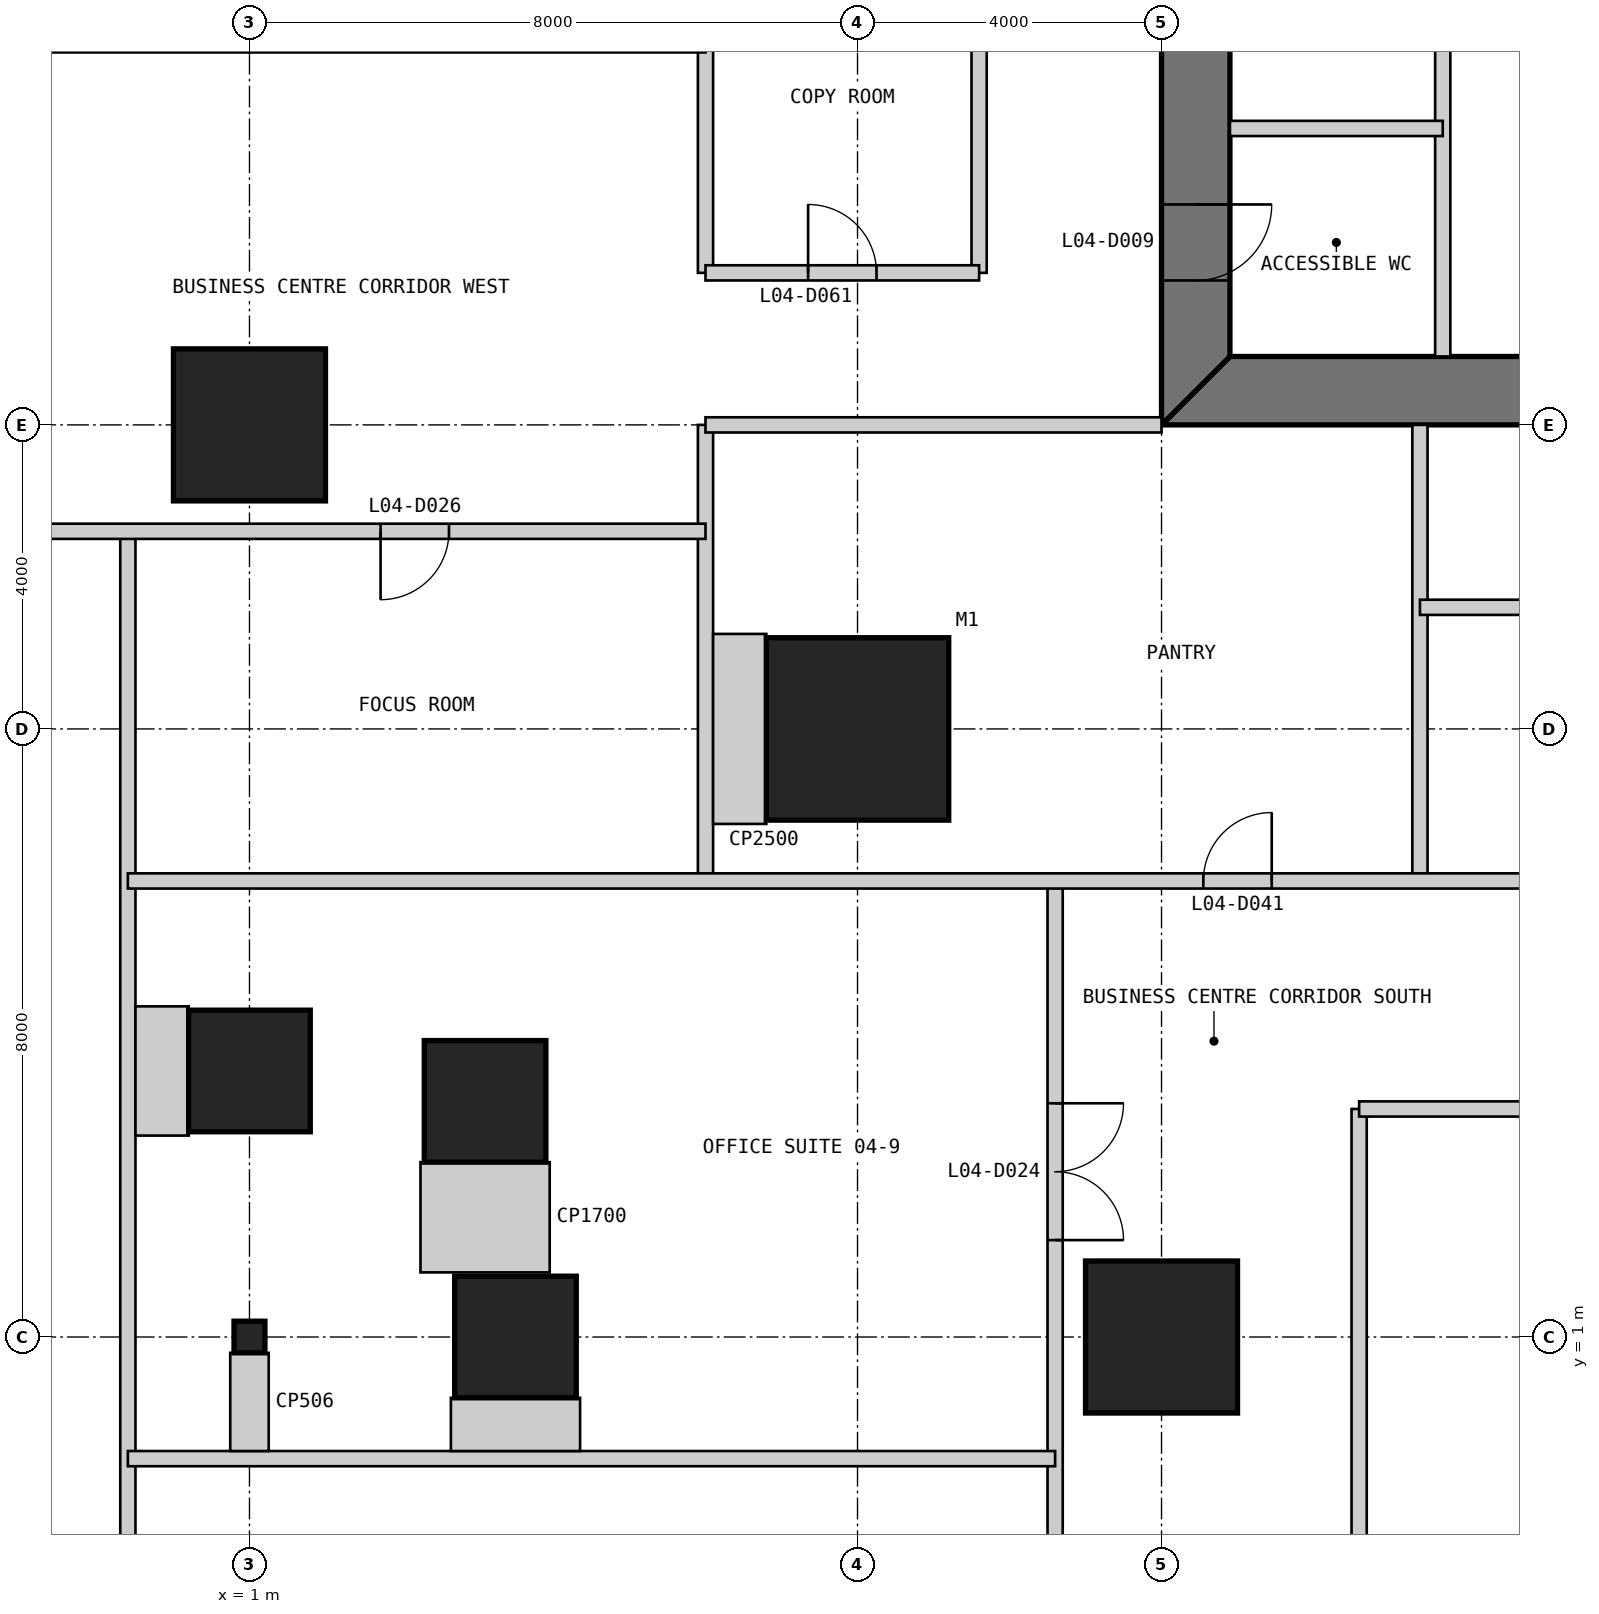
"""IFC4 building model, lengths in metres.
Left out: names, types, materials, properties, quantities, classifications, styles, units other than length and angle.
Written with IfcOpenShell. Run it as: python <this file> out.ifc"""

import sys

from ifc_helpers import new_model, si_unit, direction, frame, frame_2d, origin, origin_2d, place, context, subcontext, project, spatial, polyline, rectangle, i_section, outline, extrude, element, fill, save


model = new_model("IFC4")
c1 = context("Model", 3, precision=1e-05, world=origin(), true_north=direction((0.0, 1.0)))
c2 = subcontext(c1, "Body", "Model", "MODEL_VIEW")
j1 = project(units=[si_unit("LENGTHUNIT", "METRE"), si_unit("PLANEANGLEUNIT", "RADIAN")], contexts=[c1])
p1 = place(None, origin())
s1 = spatial("IfcSite", under=j1, at=p1, CompositionType="ELEMENT")
p2 = place(p1, origin())
s2 = spatial("IfcBuilding", under=s1, at=p2, CompositionType="ELEMENT")
p3 = place(p2, frame((0.0, 0.0, 21.4)))
s3 = spatial("IfcBuildingStorey", under=s2, at=p3, CompositionType="ELEMENT", Elevation=21.4)
p4 = place(p3, frame((9.0, 9.0, 0.0), z_axis=(0.0, 0.0, 1.0), x_axis=(1.0, 0.0, 0.0)))
e1 = element("IfcColumn", 1, at=p4, inside=s3, PredefinedType="COLUMN", context=c2, shape_type="SweptSolid", body=[
    extrude(rectangle(XDim=2.4, YDim=2.4, at=origin_2d()), origin(), (0.0, 0.0, 1.0), 4.8),
])
p5 = place(p3, frame((4.5, 1.0, 0.0), z_axis=(0.0, 0.0, 1.0), x_axis=(1.0, 0.0, 0.0)))
e2 = element("IfcColumn", 2, at=p5, inside=s3, PredefinedType="COLUMN", context=c2, shape_type="SweptSolid", body=[
    extrude(rectangle(XDim=1.6, YDim=1.6, at=origin_2d()), origin(), (0.0, 0.0, 1.0), 4.8),
])
for number, where, z_axis, x_axis in (
    (3, (13.0, 1.0, 0.0), (0.0, 0.0, 1.0), (1.0, 0.0, 0.0)),
    (4, (1.0, 13.0, 0.0), (0.0, 0.0, 1.0), (1.0, 0.0, 0.0)),
):
    element("IfcColumn", number, at=place(p3, frame(where, z_axis=z_axis, x_axis=x_axis)), inside=s3, PredefinedType="COLUMN", context=c2, shape_type="SweptSolid", body=[
        extrude(rectangle(XDim=2.0, YDim=2.0, at=origin_2d()), origin(), (0.0, 0.0, 1.0), 4.8),
    ])
for number, where, z_axis, x_axis in (
    (5, (1.0, 4.5, 0.0), (0.0, 0.0, 1.0), (1.0, 0.0, 0.0)),
    (6, (4.1, 4.1, 0.0), (0.0, 0.0, 1.0), (1.0, 0.0, 0.0)),
):
    element("IfcColumn", number, at=place(p3, frame(where, z_axis=z_axis, x_axis=x_axis)), inside=s3, PredefinedType="COLUMN", context=c2, shape_type="SweptSolid", body=[
        extrude(rectangle(XDim=1.6, YDim=1.6, at=origin_2d()), origin(), (0.0, 0.0, 1.0), 4.8),
    ])
p6 = place(p3, frame((1.0, 1.0, 0.0), z_axis=(0.0, 0.0, 1.0), x_axis=(1.0, 0.0, 0.0)))
e7 = element("IfcColumn", 7, at=p6, inside=s3, PredefinedType="COLUMN", context=c2, shape_type="SweptSolid", body=[
    extrude(i_section(OverallWidth=0.406, OverallDepth=0.417, WebThickness=0.03, FlangeThickness=0.048, at=origin_2d()), origin(), (0.0, 0.0, 1.0), 4.8),
])
p7 = place(p3, frame((13.0, 13.45, 0.0), z_axis=(0.0, 0.0, 1.0), x_axis=(1.0, 0.0, 0.0)))
e8 = element("IfcWall", 8, at=p7, inside=s3, PredefinedType="SHEAR", context=c2, shape_type="SweptSolid", body=[
    extrude(outline(polyline([(0.0, -0.45), (24.0, -0.45), (23.1, 0.45), (0.9, 0.45), (0.0, -0.45)])), origin(), (0.0, 0.0, 1.0), 4.8),
])
p8 = place(p7, frame((4.9, 0.0, 0.0)))
e9 = element("IfcOpeningElement", 9, at=p8, cuts=e8, PredefinedType="OPENING", context=c2, shape_type="SweptSolid", body=[
    extrude(rectangle(XDim=1.0, YDim=2.2, at=frame_2d((0.5, 1.1))), frame((0.0, 0.46, 0.0), z_axis=(0.0, -1.0, 0.0), x_axis=(1.0, 0.0, 0.0)), (0.0, 0.0, 1.0), 0.92),
])
p9 = place(p7, frame((8.9, 0.0, 0.0)))
e10 = element("IfcOpeningElement", 10, at=p9, cuts=e8, PredefinedType="OPENING", context=c2, shape_type="SweptSolid", body=[
    extrude(rectangle(XDim=1.1, YDim=2.2, at=frame_2d((0.55, 1.1))), frame((0.0, 0.46, 0.0), z_axis=(0.0, -1.0, 0.0), x_axis=(1.0, 0.0, 0.0)), (0.0, 0.0, 1.0), 0.92),
])
p10 = place(p7, frame((15.05, 0.0, 0.0)))
e11 = element("IfcOpeningElement", 11, at=p10, cuts=e8, PredefinedType="OPENING", context=c2, shape_type="SweptSolid", body=[
    extrude(rectangle(XDim=0.9, YDim=2.2, at=frame_2d((0.45, 1.1))), frame((0.0, 0.46, 0.0), z_axis=(0.0, -1.0, 0.0), x_axis=(1.0, 0.0, 0.0)), (0.0, 0.0, 1.0), 0.92),
])
p11 = place(p7, frame((17.9, 0.0, 0.0)))
e12 = element("IfcOpeningElement", 12, at=p11, cuts=e8, PredefinedType="OPENING", context=c2, shape_type="SweptSolid", body=[
    extrude(rectangle(XDim=1.0, YDim=2.2, at=frame_2d((0.5, 1.1))), frame((0.0, 0.46, 0.0), z_axis=(0.0, -1.0, 0.0), x_axis=(1.0, 0.0, 0.0)), (0.0, 0.0, 1.0), 0.92),
])
p12 = place(p7, frame((21.4, 0.0, 0.0)))
e13 = element("IfcOpeningElement", 13, at=p12, cuts=e8, PredefinedType="OPENING", context=c2, shape_type="SweptSolid", body=[
    extrude(rectangle(XDim=1.0, YDim=2.2, at=frame_2d((0.5, 1.1))), frame((0.0, 0.46, 0.0), z_axis=(0.0, -1.0, 0.0), x_axis=(1.0, 0.0, 0.0)), (0.0, 0.0, 1.0), 0.92),
])
p13 = place(p3, frame((13.45, 36.1, 0.0), z_axis=(0.0, 0.0, 1.0), x_axis=(0.0, -1.0, 0.0)))
e14 = element("IfcWall", 14, at=p13, inside=s3, PredefinedType="SHEAR", context=c2, shape_type="SweptSolid", body=[
    extrude(outline(polyline([(-0.9, -0.45), (23.1, -0.45), (22.2, 0.45), (0.0, 0.45), (-0.9, -0.45)])), origin(), (0.0, 0.0, 1.0), 4.8),
])
p14 = place(p13, frame((20.2, 0.0, 0.0)))
e15 = element("IfcOpeningElement", 15, at=p14, cuts=e14, PredefinedType="OPENING", context=c2, shape_type="SweptSolid", body=[
    extrude(rectangle(XDim=1.0, YDim=2.2, at=frame_2d((0.5, 1.1))), frame((0.0, 0.46, 0.0), z_axis=(0.0, -1.0, 0.0), x_axis=(1.0, 0.0, 0.0)), (0.0, 0.0, 1.0), 0.92),
])
p15 = place(p13, frame((17.25, 0.0, 0.0)))
e16 = element("IfcOpeningElement", 16, at=p15, cuts=e14, PredefinedType="OPENING", context=c2, shape_type="SweptSolid", body=[
    extrude(rectangle(XDim=0.9, YDim=2.2, at=frame_2d((0.45, 1.1))), frame((0.0, 0.46, 0.0), z_axis=(0.0, -1.0, 0.0), x_axis=(1.0, 0.0, 0.0)), (0.0, 0.0, 1.0), 0.92),
])
p16 = place(p3, frame((16.7, 13.9, 0.0), z_axis=(0.0, 0.0, 1.0), x_axis=(0.0, 1.0, 0.0)))
e17 = element("IfcWall", 17, at=p16, inside=s3, PredefinedType="PARTITIONING", context=c2, shape_type="SweptSolid", body=[
    extrude(rectangle(XDim=16.1, YDim=0.2, at=frame_2d((8.05, 0.0))), origin(), (0.0, 0.0, 1.0), 4.6),
])
p17 = place(p3, frame((13.9, 16.9, 0.0), z_axis=(0.0, 0.0, 1.0), x_axis=(1.0, 0.0, 0.0)))
e18 = element("IfcWall", 18, at=p17, inside=s3, PredefinedType="PARTITIONING", context=c2, shape_type="SweptSolid", body=[
    extrude(rectangle(XDim=2.8, YDim=0.2, at=frame_2d((1.4, 0.0))), origin(), (0.0, 0.0, 1.0), 4.6),
])
p18 = place(p3, frame((-0.6, -7.25, 0.0), z_axis=(0.0, 0.0, 1.0), x_axis=(0.0, 1.0, 0.0)))
e19 = element("IfcWall", 19, at=p18, inside=s3, PredefinedType="PARTITIONING", context=c2, shape_type="SweptSolid", body=[
    extrude(rectangle(XDim=18.85, YDim=0.2, at=frame_2d((9.425, 0.0))), origin(), (0.0, 0.0, 1.0), 4.5),
])
p19 = place(p3, frame((7.0, 7.0, 0.0), z_axis=(0.0, 0.0, 1.0), x_axis=(0.0, 1.0, 0.0)))
e20 = element("IfcWall", 20, at=p19, inside=s3, PredefinedType="PARTITIONING", context=c2, shape_type="SweptSolid", body=[
    extrude(rectangle(XDim=6.0, YDim=0.2, at=frame_2d((3.0, 0.0))), origin(), (0.0, 0.0, 1.0), 4.5),
])
p20 = place(p3, frame((7.0, 15.0, 0.0), z_axis=(0.0, 0.0, 1.0), x_axis=(0.0, 1.0, 0.0)))
e21 = element("IfcWall", 21, at=p20, inside=s3, PredefinedType="PARTITIONING", context=c2, shape_type="SweptSolid", body=[
    extrude(rectangle(XDim=28.0, YDim=0.2, at=frame_2d((14.0, 0.0))), origin(), (0.0, 0.0, 1.0), 3.843),
])
p21 = place(p3, frame((10.6, 15.0, 0.0), z_axis=(0.0, 0.0, 1.0), x_axis=(0.0, 1.0, 0.0)))
e22 = element("IfcWall", 22, at=p21, inside=s3, PredefinedType="PARTITIONING", context=c2, shape_type="SweptSolid", body=[
    extrude(rectangle(XDim=4.6, YDim=0.2, at=frame_2d((2.3, 0.0))), origin(), (0.0, 0.0, 1.0), 4.5),
])
p22 = place(p3, frame((11.6, -7.25, 0.0), z_axis=(0.0, 0.0, 1.0), x_axis=(0.0, 1.0, 0.0)))
e23 = element("IfcWall", 23, at=p22, inside=s3, PredefinedType="PARTITIONING", context=c2, shape_type="SweptSolid", body=[
    extrude(rectangle(XDim=14.25, YDim=0.2, at=frame_2d((7.125, 0.0))), origin(), (0.0, 0.0, 1.0), 4.5),
])
p23 = place(p22, frame((2.45, 0.0, 0.0)))
e24 = element("IfcOpeningElement", 24, at=p23, cuts=e23, PredefinedType="OPENING", context=c2, shape_type="SweptSolid", body=[
    extrude(rectangle(XDim=1.8, YDim=2.4, at=frame_2d((0.9, 1.2))), frame((0.0, 0.11, 0.0), z_axis=(0.0, -1.0, 0.0), x_axis=(1.0, 0.0, 0.0)), (0.0, 0.0, 1.0), 0.22),
])
p24 = place(p22, frame((9.525, 0.0, 0.0)))
e25 = element("IfcOpeningElement", 25, at=p24, cuts=e23, PredefinedType="OPENING", context=c2, shape_type="SweptSolid", body=[
    extrude(rectangle(XDim=1.8, YDim=2.4, at=frame_2d((0.9, 1.2))), frame((0.0, 0.11, 0.0), z_axis=(0.0, -1.0, 0.0), x_axis=(1.0, 0.0, 0.0)), (0.0, 0.0, 1.0), 0.22),
])
for number, where, z_axis, x_axis in (
    (26, (15.6, -2.0, 0.0), (0.0, 0.0, 1.0), (0.0, 1.0, 0.0)),
    (27, (16.4, 7.0, 0.0), (0.0, 0.0, 1.0), (0.0, 1.0, 0.0)),
):
    element("IfcWall", number, at=place(p3, frame(where, z_axis=z_axis, x_axis=x_axis)), inside=s3, PredefinedType="PARTITIONING", context=c2, shape_type="SweptSolid", body=[
        extrude(rectangle(XDim=6.0, YDim=0.2, at=frame_2d((3.0, 0.0))), origin(), (0.0, 0.0, 1.0), 4.5),
    ])
p25 = place(p3, frame((-0.6, -0.6, 0.0), z_axis=(0.0, 0.0, 1.0), x_axis=(1.0, 0.0, 0.0)))
e28 = element("IfcWall", 28, at=p25, inside=s3, PredefinedType="PARTITIONING", context=c2, shape_type="SweptSolid", body=[
    extrude(rectangle(XDim=12.2, YDim=0.2, at=frame_2d((6.1, 0.0))), origin(), (0.0, 0.0, 1.0), 4.5),
])
p26 = place(p3, frame((15.6, 4.0, 0.0), z_axis=(0.0, 0.0, 1.0), x_axis=(1.0, 0.0, 0.0)))
e29 = element("IfcWall", 29, at=p26, inside=s3, PredefinedType="PARTITIONING", context=c2, shape_type="SweptSolid", body=[
    extrude(rectangle(XDim=7.3, YDim=0.2, at=frame_2d((3.65, 0.0))), origin(), (0.0, 0.0, 1.0), 4.5),
])
p27 = place(p26, frame((3.2, 0.0, 0.0)))
e30 = element("IfcOpeningElement", 30, at=p27, cuts=e29, PredefinedType="OPENING", context=c2, shape_type="SweptSolid", body=[
    extrude(rectangle(XDim=0.9, YDim=2.2, at=frame_2d((0.45, 1.1))), frame((0.0, 0.11, 0.0), z_axis=(0.0, -1.0, 0.0), x_axis=(1.0, 0.0, 0.0)), (0.0, 0.0, 1.0), 0.22),
])
p28 = place(p3, frame((-0.6, 7.0, 0.0), z_axis=(0.0, 0.0, 1.0), x_axis=(1.0, 0.0, 0.0)))
e31 = element("IfcWall", 31, at=p28, inside=s3, PredefinedType="PARTITIONING", context=c2, shape_type="SweptSolid", body=[
    extrude(rectangle(XDim=23.8, YDim=0.2, at=frame_2d((11.9, 0.0))), origin(), (0.0, 0.0, 1.0), 4.5),
])
p29 = place(p28, frame((14.15, 0.0, 0.0)))
e32 = element("IfcOpeningElement", 32, at=p29, cuts=e31, PredefinedType="OPENING", context=c2, shape_type="SweptSolid", body=[
    extrude(rectangle(XDim=0.9, YDim=2.2, at=frame_2d((0.45, 1.1))), frame((0.0, 0.11, 0.0), z_axis=(0.0, -1.0, 0.0), x_axis=(1.0, 0.0, 0.0)), (0.0, 0.0, 1.0), 0.22),
])
p30 = place(p3, frame((16.4, 10.6, 0.0), z_axis=(0.0, 0.0, 1.0), x_axis=(1.0, 0.0, 0.0)))
e33 = element("IfcWall", 33, at=p30, inside=s3, PredefinedType="PARTITIONING", context=c2, shape_type="SweptSolid", body=[
    extrude(rectangle(XDim=6.8, YDim=0.2, at=frame_2d((3.4, 0.0))), origin(), (0.0, 0.0, 1.0), 4.5),
])
p31 = place(p30, frame((2.95, 0.0, 0.0)))
e34 = element("IfcOpeningElement", 34, at=p31, cuts=e33, PredefinedType="OPENING", context=c2, shape_type="SweptSolid", body=[
    extrude(rectangle(XDim=0.9, YDim=2.2, at=frame_2d((0.45, 1.1))), frame((0.0, 0.11, 0.0), z_axis=(0.0, -1.0, 0.0), x_axis=(1.0, 0.0, 0.0)), (0.0, 0.0, 1.0), 0.22),
])
p32 = place(p3, frame((-7.25, 11.6, 0.0), z_axis=(0.0, 0.0, 1.0), x_axis=(1.0, 0.0, 0.0)))
e35 = element("IfcWall", 35, at=p32, inside=s3, PredefinedType="PARTITIONING", context=c2, shape_type="SweptSolid", body=[
    extrude(rectangle(XDim=14.25, YDim=0.2, at=frame_2d((7.125, 0.0))), origin(), (0.0, 0.0, 1.0), 4.5),
])
p33 = place(p32, frame((2.45, 0.0, 0.0)))
e36 = element("IfcOpeningElement", 36, at=p33, cuts=e35, PredefinedType="OPENING", context=c2, shape_type="SweptSolid", body=[
    extrude(rectangle(XDim=1.8, YDim=2.4, at=frame_2d((0.9, 1.2))), frame((0.0, 0.11, 0.0), z_axis=(0.0, -1.0, 0.0), x_axis=(1.0, 0.0, 0.0)), (0.0, 0.0, 1.0), 0.22),
])
p34 = place(p32, frame((9.975, 0.0, 0.0)))
e37 = element("IfcOpeningElement", 37, at=p34, cuts=e35, PredefinedType="OPENING", context=c2, shape_type="SweptSolid", body=[
    extrude(rectangle(XDim=0.9, YDim=2.2, at=frame_2d((0.45, 1.1))), frame((0.0, 0.11, 0.0), z_axis=(0.0, -1.0, 0.0), x_axis=(1.0, 0.0, 0.0)), (0.0, 0.0, 1.0), 0.22),
])
p35 = place(p3, frame((7.0, 13.0, 0.0), z_axis=(0.0, 0.0, 1.0), x_axis=(1.0, 0.0, 0.0)))
e38 = element("IfcWall", 38, at=p35, inside=s3, PredefinedType="PARTITIONING", context=c2, shape_type="SweptSolid", body=[
    extrude(rectangle(XDim=6.0, YDim=0.2, at=frame_2d((3.0, 0.0))), origin(), (0.0, 0.0, 1.0), 3.653),
])
p36 = place(p3, frame((7.0, 15.0, 0.0), z_axis=(0.0, 0.0, 1.0), x_axis=(1.0, 0.0, 0.0)))
e39 = element("IfcWall", 39, at=p36, inside=s3, PredefinedType="PARTITIONING", context=c2, shape_type="SweptSolid", body=[
    extrude(rectangle(XDim=3.6, YDim=0.2, at=frame_2d((1.8, 0.0))), origin(), (0.0, 0.0, 1.0), 4.5),
])
p37 = place(p36, frame((1.35, 0.0, 0.0)))
e40 = element("IfcOpeningElement", 40, at=p37, cuts=e39, PredefinedType="OPENING", context=c2, shape_type="SweptSolid", body=[
    extrude(rectangle(XDim=0.9, YDim=2.2, at=frame_2d((0.45, 1.1))), frame((0.0, 0.11, 0.0), z_axis=(0.0, -1.0, 0.0), x_axis=(1.0, 0.0, 0.0)), (0.0, 0.0, 1.0), 0.22),
])
for number, where, z_axis, x_axis in (
    (41, (4.5, -0.5, 0.0), (0.0, 0.0, 1.0), (0.0, 1.0, 0.0)),
    (42, (-0.5, 4.5, 0.0), (0.0, 0.0, 1.0), (1.0, 0.0, 0.0)),
):
    element("IfcWall", number, at=place(p3, frame(where, z_axis=z_axis, x_axis=x_axis)), inside=s3, PredefinedType="PARTITIONING", context=c2, shape_type="SweptSolid", body=[
        extrude(rectangle(XDim=0.7, YDim=1.7, at=frame_2d((0.35, 0.0))), origin(), (0.0, 0.0, 1.0), 4.5),
    ])
p38 = place(p3, frame((4.1, 1.85, 0.0), z_axis=(0.0, 0.0, 1.0), x_axis=(0.0, 1.0, 0.0)))
e43 = element("IfcWall", 43, at=p38, inside=s3, PredefinedType="PARTITIONING", context=c2, shape_type="SweptSolid", body=[
    extrude(rectangle(XDim=1.45, YDim=1.7, at=frame_2d((0.725, 0.0))), origin(), (0.0, 0.0, 1.0), 4.5),
])
p39 = place(p3, frame((1.0, -0.5, 0.0), z_axis=(0.0, 0.0, 1.0), x_axis=(0.0, 1.0, 0.0)))
e44 = element("IfcWall", 44, at=p39, inside=s3, PredefinedType="PARTITIONING", context=c2, shape_type="SweptSolid", body=[
    extrude(rectangle(XDim=1.292, YDim=0.506, at=frame_2d((0.646, 0.0))), origin(), (0.0, 0.0, 1.0), 3.754),
])
p40 = place(p3, frame((7.1, 9.0, 0.0), z_axis=(0.0, 0.0, 1.0), x_axis=(1.0, 0.0, 0.0)))
e45 = element("IfcWall", 45, at=p40, inside=s3, PredefinedType="PARTITIONING", context=c2, shape_type="SweptSolid", body=[
    extrude(rectangle(XDim=0.7, YDim=2.5, at=frame_2d((0.35, 0.0))), origin(), (0.0, 0.0, 1.0), 4.5),
])
p41 = place(p14, origin())
e46 = element("IfcDoor", 46, at=p41, inside=s3, OperationType="SINGLE_SWING_LEFT", PredefinedType="DOOR", context=c2, shape_type="SweptSolid", body=[
    extrude(rectangle(XDim=1.0, YDim=2.2, at=frame_2d((0.5, 1.1))), frame((0.0, 0.025, 0.0), z_axis=(0.0, -1.0, 0.0), x_axis=(1.0, 0.0, 0.0)), (0.0, 0.0, 1.0), 0.05),
    extrude(outline(polyline([(0.0, 0.0), (0.04, 0.0), (0.04, 2.16), (0.96, 2.16), (0.96, 0.0), (1.0, 0.0), (1.0, 2.2), (0.0, 2.2), (0.0, 0.0)])), frame((0.0, 0.3, 0.0), z_axis=(0.0, -1.0, 0.0), x_axis=(1.0, 0.0, 0.0)), (0.0, 0.0, 1.0), 0.6),
])
fill(e15, e46)
p42 = place(p24, frame((1.8, 0.0, 0.0), z_axis=(0.0, 0.0, 1.0), x_axis=(-1.0, 0.0, 0.0)))
e47 = element("IfcDoor", 47, at=p42, inside=s3, OperationType="DOUBLE_DOOR_SINGLE_SWING", PredefinedType="DOOR", context=c2, shape_type="SweptSolid", body=[
    extrude(rectangle(XDim=1.8, YDim=2.4, at=frame_2d((0.9, 1.2))), frame((0.0, 0.025, 0.0), z_axis=(0.0, -1.0, 0.0), x_axis=(1.0, 0.0, 0.0)), (0.0, 0.0, 1.0), 0.05),
])
fill(e25, e47)
p43 = place(p34, frame((0.9, 0.0, 0.0), z_axis=(0.0, 0.0, 1.0), x_axis=(-1.0, 0.0, 0.0)))
e48 = element("IfcDoor", 48, at=p43, inside=s3, OperationType="SINGLE_SWING_RIGHT", PredefinedType="DOOR", context=c2, shape_type="SweptSolid", body=[
    extrude(rectangle(XDim=0.9, YDim=2.2, at=frame_2d((0.45, 1.1))), frame((0.0, 0.025, 0.0), z_axis=(0.0, -1.0, 0.0), x_axis=(1.0, 0.0, 0.0)), (0.0, 0.0, 1.0), 0.05),
])
fill(e37, e48)
p44 = place(p29, origin())
e49 = element("IfcDoor", 49, at=p44, inside=s3, OperationType="SINGLE_SWING_RIGHT", PredefinedType="DOOR", context=c2, shape_type="SweptSolid", body=[
    extrude(rectangle(XDim=0.9, YDim=2.2, at=frame_2d((0.45, 1.1))), frame((0.0, 0.025, 0.0), z_axis=(0.0, -1.0, 0.0), x_axis=(1.0, 0.0, 0.0)), (0.0, 0.0, 1.0), 0.05),
])
fill(e32, e49)
p45 = place(p37, origin())
e50 = element("IfcDoor", 50, at=p45, inside=s3, OperationType="SINGLE_SWING_LEFT", PredefinedType="DOOR", context=c2, shape_type="SweptSolid", body=[
    extrude(rectangle(XDim=0.9, YDim=2.2, at=frame_2d((0.45, 1.1))), frame((0.0, 0.025, 0.0), z_axis=(0.0, -1.0, 0.0), x_axis=(1.0, 0.0, 0.0)), (0.0, 0.0, 1.0), 0.05),
])
fill(e40, e50)
save(model, sys.argv[1])
